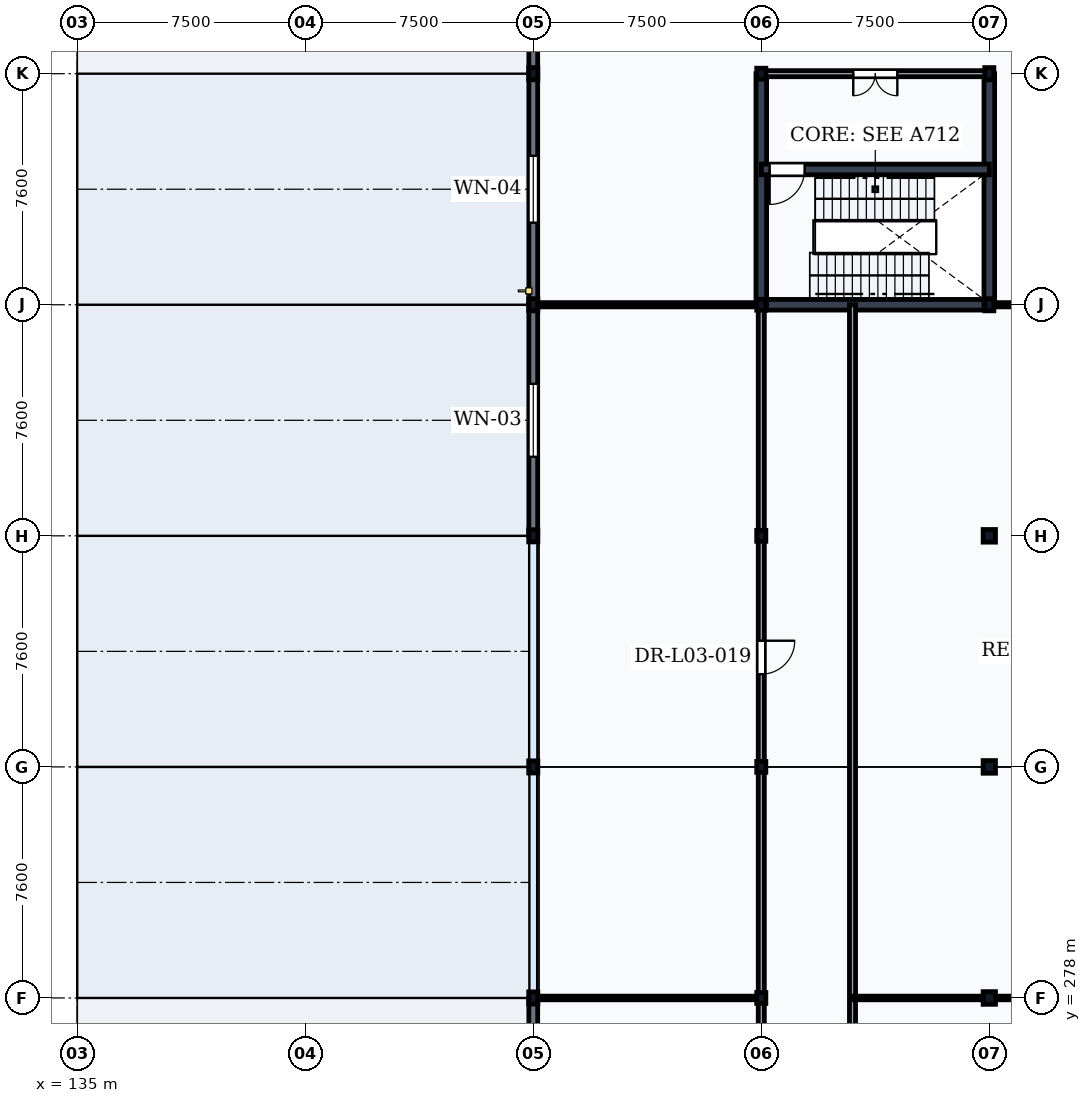
"""IFC4 building model, lengths in metres.
Left out: names, types, materials, properties, quantities, classifications, styles, units other than length and angle.
Written with IfcOpenShell. Run it as: python <this file> out.ifc"""

import sys

from ifc_helpers import new_model, si_unit, direction, frame, frame_2d, origin, origin_2d, place, context, subcontext, project, spatial, rectangle, i_section, extrude, element, fill, save


model = new_model("IFC4")
c1 = context("Model", 3, precision=1e-05, world=origin(), true_north=direction((0.0, 1.0)))
c2 = subcontext(c1, "Body", "Model", "MODEL_VIEW")
j1 = project(units=[si_unit("LENGTHUNIT", "METRE"), si_unit("PLANEANGLEUNIT", "RADIAN")], contexts=[c1])
p1 = place(None, origin())
s1 = spatial("IfcSite", under=j1, at=p1, CompositionType="ELEMENT")
p2 = place(p1, origin())
s2 = spatial("IfcBuilding", under=s1, at=p2, CompositionType="ELEMENT")
p3 = place(p2, frame((0.0, 0.0, 5.4)))
s3 = spatial("IfcBuildingStorey", under=s2, at=p3, CompositionType="ELEMENT", Elevation=5.4)
for number, where, z_axis, x_axis in (
    (1, (135.0, 278.0, 0.0), (0.0, 0.0, 1.0), (1.0, 0.0, 0.0)),
    (2, (135.0, 285.6, 0.0), (0.0, 0.0, 1.0), (1.0, 0.0, 0.0)),
    (3, (135.0, 293.2, 0.0), (0.0, 0.0, 1.0), (1.0, 0.0, 0.0)),
    (4, (135.0, 300.8, 0.0), (0.0, 0.0, 1.0), (1.0, 0.0, 0.0)),
    (5, (135.0, 308.4, 0.0), (0.0, 0.0, 1.0), (1.0, 0.0, 0.0)),
):
    element("IfcColumn", number, at=place(p3, frame(where, z_axis=z_axis, x_axis=x_axis)), inside=s3, PredefinedType="COLUMN", context=c2, shape_type="SweptSolid", body=[
        extrude(i_section(OverallWidth=0.3, OverallDepth=0.45, WebThickness=0.014, FlangeThickness=0.026, FilletRadius=0.027, at=origin_2d()), origin(), (0.0, 0.0, 1.0), 5.1),
    ])
for number, where, z_axis, x_axis in (
    (6, (142.5, 278.0, 0.0), (0.0, 0.0, 1.0), (1.0, 0.0, 0.0)),
    (7, (142.5, 285.6, 0.0), (0.0, 0.0, 1.0), (1.0, 0.0, 0.0)),
    (8, (142.5, 293.2, 0.0), (0.0, 0.0, 1.0), (1.0, 0.0, 0.0)),
    (9, (142.5, 300.8, 0.0), (0.0, 0.0, 1.0), (1.0, 0.0, 0.0)),
    (10, (142.5, 308.4, 0.0), (0.0, 0.0, 1.0), (1.0, 0.0, 0.0)),
):
    element("IfcColumn", number, at=place(p3, frame(where, z_axis=z_axis, x_axis=x_axis)), inside=s3, PredefinedType="COLUMN", context=c2, shape_type="SweptSolid", body=[
        extrude(i_section(OverallWidth=0.3, OverallDepth=0.4, WebThickness=0.013, FlangeThickness=0.024, FilletRadius=0.027, at=origin_2d()), origin(), (0.0, 0.0, 1.0), 5.1),
    ])
for number, where, z_axis, x_axis in (
    (11, (150.0, 278.0, 0.0), (0.0, 0.0, 1.0), (1.0, 0.0, 0.0)),
    (12, (150.0, 285.6, 0.0), (0.0, 0.0, 1.0), (1.0, 0.0, 0.0)),
    (13, (150.0, 293.2, 0.0), (0.0, 0.0, 1.0), (1.0, 0.0, 0.0)),
    (14, (150.0, 300.8, 0.0), (0.0, 0.0, 1.0), (1.0, 0.0, 0.0)),
    (15, (150.0, 308.4, 0.0), (0.0, 0.0, 1.0), (1.0, 0.0, 0.0)),
):
    element("IfcColumn", number, at=place(p3, frame(where, z_axis=z_axis, x_axis=x_axis)), inside=s3, PredefinedType="COLUMN", context=c2, shape_type="SweptSolid", body=[
        extrude(i_section(OverallWidth=0.3, OverallDepth=0.45, WebThickness=0.014, FlangeThickness=0.026, FilletRadius=0.027, at=origin_2d()), origin(), (0.0, 0.0, 1.0), 5.1),
    ])
for number, where, z_axis, x_axis in (
    (16, (157.5, 278.0, 0.0), (0.0, 0.0, 1.0), (1.0, 0.0, 0.0)),
    (17, (157.5, 285.6, 0.0), (0.0, 0.0, 1.0), (1.0, 0.0, 0.0)),
    (18, (157.5, 293.2, 0.0), (0.0, 0.0, 1.0), (1.0, 0.0, 0.0)),
    (19, (157.5, 300.8, 0.0), (0.0, 0.0, 1.0), (1.0, 0.0, 0.0)),
    (20, (157.5, 308.4, 0.0), (0.0, 0.0, 1.0), (1.0, 0.0, 0.0)),
):
    element("IfcColumn", number, at=place(p3, frame(where, z_axis=z_axis, x_axis=x_axis)), inside=s3, PredefinedType="COLUMN", context=c2, shape_type="SweptSolid", body=[
        extrude(i_section(OverallWidth=0.3, OverallDepth=0.4, WebThickness=0.013, FlangeThickness=0.024, FilletRadius=0.027, at=origin_2d()), origin(), (0.0, 0.0, 1.0), 5.1),
    ])
for number, where, z_axis, x_axis in (
    (21, (165.0, 278.0, 0.0), (0.0, 0.0, 1.0), (1.0, 0.0, 0.0)),
    (22, (165.0, 285.6, 0.0), (0.0, 0.0, 1.0), (1.0, 0.0, 0.0)),
    (23, (165.0, 293.2, 0.0), (0.0, 0.0, 1.0), (1.0, 0.0, 0.0)),
):
    element("IfcColumn", number, at=place(p3, frame(where, z_axis=z_axis, x_axis=x_axis)), inside=s3, PredefinedType="COLUMN", context=c2, shape_type="SweptSolid", body=[
        extrude(i_section(OverallWidth=0.418, OverallDepth=0.455, WebThickness=0.042, FlangeThickness=0.068, FilletRadius=0.015, at=origin_2d()), origin(), (0.0, 0.0, 1.0), 5.1),
    ])
for number, where, z_axis, x_axis in (
    (24, (165.0, 300.8, 0.0), (0.0, 0.0, 1.0), (1.0, 0.0, 0.0)),
    (25, (165.0, 308.4, 0.0), (0.0, 0.0, 1.0), (1.0, 0.0, 0.0)),
):
    element("IfcColumn", number, at=place(p3, frame(where, z_axis=z_axis, x_axis=x_axis)), inside=s3, PredefinedType="COLUMN", context=c2, shape_type="SweptSolid", body=[
        extrude(i_section(OverallWidth=0.3, OverallDepth=0.45, WebThickness=0.014, FlangeThickness=0.026, FilletRadius=0.027, at=origin_2d()), origin(), (0.0, 0.0, 1.0), 5.1),
    ])
p4 = place(p3, frame((135.0, 270.406, 0.0), z_axis=(0.0, 0.0, 1.0), x_axis=(0.0, 1.0, 0.0)))
e26 = element("IfcWall", 26, at=p4, inside=s3, PredefinedType="SOLIDWALL", context=c2, shape_type="SweptSolid", body=[
    extrude(rectangle(XDim=7.588, YDim=0.29, at=frame_2d((3.794, 0.0))), origin(), (0.0, 0.0, 1.0), 4.578),
])
p5 = place(p4, frame((2.994, 0.0, 0.95)))
e27 = element("IfcOpeningElement", 27, at=p5, cuts=e26, PredefinedType="OPENING", context=c2, shape_type="SweptSolid", body=[
    extrude(rectangle(XDim=1.6, YDim=2.4, at=frame_2d((0.8, 1.2))), frame((0.0, 0.16, 0.0), z_axis=(0.0, -1.0, 0.0), x_axis=(1.0, 0.0, 0.0)), (0.0, 0.0, 1.0), 0.32),
])
p6 = place(p3, frame((135.0, 293.206, 0.0), z_axis=(0.0, 0.0, 1.0), x_axis=(0.0, 1.0, 0.0)))
e28 = element("IfcWall", 28, at=p6, inside=s3, PredefinedType="SOLIDWALL", context=c2, shape_type="SweptSolid", body=[
    extrude(rectangle(XDim=7.588, YDim=0.29, at=frame_2d((3.794, 0.0))), origin(), (0.0, 0.0, 1.0), 4.578),
])
p7 = place(p6, frame((2.494, 0.0, 0.95)))
e29 = element("IfcOpeningElement", 29, at=p7, cuts=e28, PredefinedType="OPENING", context=c2, shape_type="SweptSolid", body=[
    extrude(rectangle(XDim=2.6, YDim=3.0, at=frame_2d((1.3, 1.5))), frame((0.0, 0.16, 0.0), z_axis=(0.0, -1.0, 0.0), x_axis=(1.0, 0.0, 0.0)), (0.0, 0.0, 1.0), 0.32),
])
p8 = place(p3, frame((135.0, 300.806, 0.0), z_axis=(0.0, 0.0, 1.0), x_axis=(0.0, 1.0, 0.0)))
e30 = element("IfcWall", 30, at=p8, inside=s3, PredefinedType="SOLIDWALL", context=c2, shape_type="SweptSolid", body=[
    extrude(rectangle(XDim=7.588, YDim=0.29, at=frame_2d((3.794, 0.0))), origin(), (0.0, 0.0, 1.0), 4.578),
])
p9 = place(p8, frame((2.594, 0.0, 0.95)))
e31 = element("IfcOpeningElement", 31, at=p9, cuts=e30, PredefinedType="OPENING", context=c2, shape_type="SweptSolid", body=[
    extrude(rectangle(XDim=2.4, YDim=2.8, at=frame_2d((1.2, 1.4))), frame((0.0, 0.16, 0.0), z_axis=(0.0, -1.0, 0.0), x_axis=(1.0, 0.0, 0.0)), (0.0, 0.0, 1.0), 0.32),
])
p10 = place(p3, frame((135.0, 308.406, 0.0), z_axis=(0.0, 0.0, 1.0), x_axis=(0.0, 1.0, 0.0)))
e32 = element("IfcWall", 32, at=p10, inside=s3, PredefinedType="SOLIDWALL", context=c2, shape_type="SweptSolid", body=[
    extrude(rectangle(XDim=7.588, YDim=0.29, at=frame_2d((3.794, 0.0))), origin(), (0.0, 0.0, 1.0), 4.578),
])
p11 = place(p10, frame((2.694, 0.0, 0.95)))
e33 = element("IfcOpeningElement", 33, at=p11, cuts=e32, PredefinedType="OPENING", context=c2, shape_type="SweptSolid", body=[
    extrude(rectangle(XDim=2.2, YDim=2.8, at=frame_2d((1.1, 1.4))), frame((0.0, 0.16, 0.0), z_axis=(0.0, -1.0, 0.0), x_axis=(1.0, 0.0, 0.0)), (0.0, 0.0, 1.0), 0.32),
])
p12 = place(p3, frame((135.1, 248.6, 5.1), z_axis=(0.0, 0.0, 1.0), x_axis=(0.0, 1.0, 0.0)))
e34 = element("IfcWall", 34, at=p12, inside=s3, PredefinedType="PARAPET", context=c2, shape_type="SweptSolid", body=[
    extrude(rectangle(XDim=89.2, YDim=0.18, at=frame_2d((44.6, 0.0))), origin(), (0.0, 0.0, 1.0), 1.2),
])
p13 = place(p3, frame((157.5, 300.8, 0.0), z_axis=(0.0, 0.0, 1.0), x_axis=(1.0, 0.0, 0.0)))
e35 = element("IfcWall", 35, at=p13, inside=s3, PredefinedType="SHEAR", context=c2, shape_type="SweptSolid", body=[
    extrude(rectangle(XDim=7.5, YDim=0.35, at=frame_2d((3.75, 0.0))), origin(), (0.0, 0.0, 1.0), 4.86),
])
for number, where, z_axis, x_axis in (
    (36, (157.5, 300.8, 0.0), (0.0, 0.0, 1.0), (0.0, 1.0, 0.0)),
    (37, (165.0, 300.8, 0.0), (0.0, 0.0, 1.0), (0.0, 1.0, 0.0)),
):
    element("IfcWall", number, at=place(p3, frame(where, z_axis=z_axis, x_axis=x_axis)), inside=s3, PredefinedType="SHEAR", context=c2, shape_type="SweptSolid", body=[
        extrude(rectangle(XDim=7.6, YDim=0.35, at=frame_2d((3.8, 0.0))), origin(), (0.0, 0.0, 1.0), 4.86),
    ])
p14 = place(p3, frame((157.5, 305.25, 0.0), z_axis=(0.0, 0.0, 1.0), x_axis=(1.0, 0.0, 0.0)))
e38 = element("IfcWall", 38, at=p14, inside=s3, PredefinedType="SHEAR", context=c2, shape_type="SweptSolid", body=[
    extrude(rectangle(XDim=7.5, YDim=0.35, at=frame_2d((3.75, 0.0))), origin(), (0.0, 0.0, 1.0), 4.86),
])
p15 = place(p14, frame((0.275, 0.0, 0.0)))
e39 = element("IfcOpeningElement", 39, at=p15, cuts=e38, PredefinedType="OPENING", context=c2, shape_type="SweptSolid", body=[
    extrude(rectangle(XDim=1.15, YDim=2.15, at=frame_2d((0.575, 1.075))), frame((0.0, 0.19, 0.0), z_axis=(0.0, -1.0, 0.0), x_axis=(1.0, 0.0, 0.0)), (0.0, 0.0, 1.0), 0.38),
])
p16 = place(p3, frame((157.5, 308.4, 0.0), z_axis=(0.0, 0.0, 1.0), x_axis=(1.0, 0.0, 0.0)))
e40 = element("IfcWall", 40, at=p16, inside=s3, PredefinedType="PARTITIONING", context=c2, shape_type="SweptSolid", body=[
    extrude(rectangle(XDim=7.5, YDim=0.2, at=frame_2d((3.75, 0.0))), origin(), (0.0, 0.0, 1.0), 4.498),
])
p17 = place(p16, frame((3.025, 0.0, 0.0)))
e41 = element("IfcOpeningElement", 41, at=p17, cuts=e40, PredefinedType="OPENING", context=c2, shape_type="SweptSolid", body=[
    extrude(rectangle(XDim=1.45, YDim=2.2, at=frame_2d((0.725, 1.1))), frame((0.0, 0.115, 0.0), z_axis=(0.0, -1.0, 0.0), x_axis=(1.0, 0.0, 0.0)), (0.0, 0.0, 1.0), 0.23),
])
p18 = place(p3, frame((157.5, 258.2, 0.0), z_axis=(0.0, 0.0, 1.0), x_axis=(0.0, 1.0, 0.0)))
e42 = element("IfcWall", 42, at=p18, inside=s3, PredefinedType="PARTITIONING", context=c2, shape_type="SweptSolid", body=[
    extrude(rectangle(XDim=42.6, YDim=0.2, at=frame_2d((21.3, 0.0))), origin(), (0.0, 0.0, 1.0), 4.498),
])
p19 = place(p18, frame((9.45, 0.0, 0.0)))
e43 = element("IfcOpeningElement", 43, at=p19, cuts=e42, PredefinedType="OPENING", context=c2, shape_type="SweptSolid", body=[
    extrude(rectangle(XDim=1.1, YDim=2.1, at=frame_2d((0.55, 1.05))), frame((0.0, 0.115, 0.0), z_axis=(0.0, -1.0, 0.0), x_axis=(1.0, 0.0, 0.0)), (0.0, 0.0, 1.0), 0.23),
])
p20 = place(p18, frame((30.45, 0.0, 0.0)))
e44 = element("IfcOpeningElement", 44, at=p20, cuts=e42, PredefinedType="OPENING", context=c2, shape_type="SweptSolid", body=[
    extrude(rectangle(XDim=1.1, YDim=2.1, at=frame_2d((0.55, 1.05))), frame((0.0, 0.115, 0.0), z_axis=(0.0, -1.0, 0.0), x_axis=(1.0, 0.0, 0.0)), (0.0, 0.0, 1.0), 0.23),
])
p21 = place(p3, frame((157.5, 308.4, 0.0), z_axis=(0.0, 0.0, 1.0), x_axis=(0.0, 1.0, 0.0)))
e45 = element("IfcWall", 45, at=p21, inside=s3, PredefinedType="PARTITIONING", context=c2, shape_type="SweptSolid", body=[
    extrude(rectangle(XDim=29.6, YDim=0.2, at=frame_2d((14.8, 0.0))), origin(), (0.0, 0.0, 1.0), 4.498),
])
p22 = place(p21, frame((3.45, 0.0, 0.0)))
e46 = element("IfcOpeningElement", 46, at=p22, cuts=e45, PredefinedType="OPENING", context=c2, shape_type="SweptSolid", body=[
    extrude(rectangle(XDim=1.1, YDim=2.1, at=frame_2d((0.55, 1.05))), frame((0.0, 0.115, 0.0), z_axis=(0.0, -1.0, 0.0), x_axis=(1.0, 0.0, 0.0)), (0.0, 0.0, 1.0), 0.23),
])
p23 = place(p21, frame((17.25, 0.0, 0.0)))
e47 = element("IfcOpeningElement", 47, at=p23, cuts=e45, PredefinedType="OPENING", context=c2, shape_type="SweptSolid", body=[
    extrude(rectangle(XDim=1.5, YDim=2.25, at=frame_2d((0.75, 1.125))), frame((0.0, 0.115, 0.0), z_axis=(0.0, -1.0, 0.0), x_axis=(1.0, 0.0, 0.0)), (0.0, 0.0, 1.0), 0.23),
])
p24 = place(p3, frame((160.5, 258.2, 0.0), z_axis=(0.0, 0.0, 1.0), x_axis=(0.0, 1.0, 0.0)))
e48 = element("IfcWall", 48, at=p24, inside=s3, PredefinedType="PARTITIONING", context=c2, shape_type="SweptSolid", body=[
    extrude(rectangle(XDim=42.6, YDim=0.2, at=frame_2d((21.3, 0.0))), origin(), (0.0, 0.0, 1.0), 4.86),
])
p25 = place(p24, frame((20.34, 0.0, 0.0)))
e49 = element("IfcOpeningElement", 49, at=p25, cuts=e48, PredefinedType="OPENING", context=c2, shape_type="SweptSolid", body=[
    extrude(rectangle(XDim=1.8, YDim=2.4, at=frame_2d((0.9, 1.2))), frame((0.0, 0.115, 0.0), z_axis=(0.0, -1.0, 0.0), x_axis=(1.0, 0.0, 0.0)), (0.0, 0.0, 1.0), 0.23),
])
p26 = place(p3, frame((135.0, 278.0, 0.0), z_axis=(0.0, 0.0, 1.0), x_axis=(1.0, 0.0, 0.0)))
e50 = element("IfcWall", 50, at=p26, inside=s3, PredefinedType="PARTITIONING", context=c2, shape_type="SweptSolid", body=[
    extrude(rectangle(XDim=22.5, YDim=0.12, at=frame_2d((11.25, 0.0))), origin(), (0.0, 0.0, 1.0), 4.488),
])
p27 = place(p26, frame((8.3, 0.0, 0.0)))
e51 = element("IfcOpeningElement", 51, at=p27, cuts=e50, PredefinedType="OPENING", context=c2, shape_type="SweptSolid", body=[
    extrude(rectangle(XDim=1.0, YDim=2.1, at=frame_2d((0.5, 1.05))), frame((0.0, 0.075, 0.0), z_axis=(0.0, -1.0, 0.0), x_axis=(1.0, 0.0, 0.0)), (0.0, 0.0, 1.0), 0.15),
])
p28 = place(p3, frame((135.0, 300.8, 0.0), z_axis=(0.0, 0.0, 1.0), x_axis=(1.0, 0.0, 0.0)))
e52 = element("IfcWall", 52, at=p28, inside=s3, PredefinedType="PARTITIONING", context=c2, shape_type="SweptSolid", body=[
    extrude(rectangle(XDim=22.5, YDim=0.12, at=frame_2d((11.25, 0.0))), origin(), (0.0, 0.0, 1.0), 4.488),
])
p29 = place(p28, frame((8.3, 0.0, 0.0)))
e53 = element("IfcOpeningElement", 53, at=p29, cuts=e52, PredefinedType="OPENING", context=c2, shape_type="SweptSolid", body=[
    extrude(rectangle(XDim=1.0, YDim=2.1, at=frame_2d((0.5, 1.05))), frame((0.0, 0.075, 0.0), z_axis=(0.0, -1.0, 0.0), x_axis=(1.0, 0.0, 0.0)), (0.0, 0.0, 1.0), 0.15),
])
p30 = place(p3, frame((165.0, 308.4, 0.0), z_axis=(0.0, 0.0, 1.0), x_axis=(1.0, 0.0, 0.0)))
e54 = element("IfcWall", 54, at=p30, inside=s3, PredefinedType="PARTITIONING", context=c2, shape_type="SweptSolid", body=[
    extrude(rectangle(XDim=32.0, YDim=0.14, at=frame_2d((16.0, 0.0))), origin(), (0.0, 0.0, 1.0), 4.408),
])
p31 = place(p30, frame((16.6, 0.0, 0.0)))
e55 = element("IfcOpeningElement", 55, at=p31, cuts=e54, PredefinedType="OPENING", context=c2, shape_type="SweptSolid", body=[
    extrude(rectangle(XDim=1.8, YDim=2.4, at=frame_2d((0.9, 1.2))), frame((0.0, 0.085, 0.0), z_axis=(0.0, -1.0, 0.0), x_axis=(1.0, 0.0, 0.0)), (0.0, 0.0, 1.0), 0.17),
])
p32 = place(p7, origin())
e56 = element("IfcWindow", 56, at=p32, inside=s3, PartitioningType="DOUBLE_PANEL_VERTICAL", PredefinedType="WINDOW", context=c2, shape_type="SweptSolid", body=[
    extrude(rectangle(XDim=2.6, YDim=3.0, at=frame_2d((1.3, 1.5))), frame((0.0, 0.03, 0.0), z_axis=(0.0, -1.0, 0.0), x_axis=(1.0, 0.0, 0.0)), (0.0, 0.0, 1.0), 0.06),
])
fill(e29, e56)
p33 = place(p9, origin())
e57 = element("IfcWindow", 57, at=p33, inside=s3, PartitioningType="DOUBLE_PANEL_VERTICAL", PredefinedType="WINDOW", context=c2, shape_type="SweptSolid", body=[
    extrude(rectangle(XDim=2.4, YDim=2.8, at=frame_2d((1.2, 1.4))), frame((0.0, 0.03, 0.0), z_axis=(0.0, -1.0, 0.0), x_axis=(1.0, 0.0, 0.0)), (0.0, 0.0, 1.0), 0.06),
])
fill(e31, e57)
p34 = place(p15, frame((1.15, 0.0, 0.0), z_axis=(0.0, 0.0, 1.0), x_axis=(-1.0, 0.0, 0.0)))
e58 = element("IfcDoor", 58, at=p34, inside=s3, OperationType="SINGLE_SWING_RIGHT", PredefinedType="DOOR", context=c2, shape_type="SweptSolid", body=[
    extrude(rectangle(XDim=1.15, YDim=2.15, at=frame_2d((0.575, 1.075))), frame((0.0, 0.025, 0.0), z_axis=(0.0, -1.0, 0.0), x_axis=(1.0, 0.0, 0.0)), (0.0, 0.0, 1.0), 0.05),
])
fill(e39, e58)
p35 = place(p17, frame((1.45, 0.0, 0.0), z_axis=(0.0, 0.0, 1.0), x_axis=(-1.0, 0.0, 0.0)))
e59 = element("IfcDoor", 59, at=p35, inside=s3, OperationType="DOUBLE_DOOR_SINGLE_SWING", PredefinedType="DOOR", context=c2, shape_type="SweptSolid", body=[
    extrude(rectangle(XDim=1.45, YDim=2.2, at=frame_2d((0.725, 1.1))), frame((0.0, 0.025, 0.0), z_axis=(0.0, -1.0, 0.0), x_axis=(1.0, 0.0, 0.0)), (0.0, 0.0, 1.0), 0.05),
])
fill(e41, e59)
p36 = place(p20, origin())
e60 = element("IfcDoor", 60, at=p36, inside=s3, OperationType="SINGLE_SWING_RIGHT", PredefinedType="DOOR", context=c2, shape_type="SweptSolid", body=[
    extrude(rectangle(XDim=1.1, YDim=2.1, at=frame_2d((0.55, 1.05))), frame((0.0, 0.025, 0.0), z_axis=(0.0, -1.0, 0.0), x_axis=(1.0, 0.0, 0.0)), (0.0, 0.0, 1.0), 0.05),
])
fill(e44, e60)
p37 = place(p25, frame((1.8, 0.0, 0.0), z_axis=(0.0, 0.0, 1.0), x_axis=(-1.0, 0.0, 0.0)))
e61 = element("IfcDoor", 61, at=p37, inside=s3, OperationType="DOUBLE_DOOR_SINGLE_SWING", PredefinedType="DOOR", context=c2, shape_type="SweptSolid", body=[
    extrude(rectangle(XDim=1.8, YDim=2.4, at=frame_2d((0.9, 1.2))), frame((0.0, 0.025, 0.0), z_axis=(0.0, -1.0, 0.0), x_axis=(1.0, 0.0, 0.0)), (0.0, 0.0, 1.0), 0.05),
])
fill(e49, e61)
p38 = place(p27, origin())
e62 = element("IfcDoor", 62, at=p38, inside=s3, OperationType="SINGLE_SWING_LEFT", PredefinedType="DOOR", context=c2, shape_type="SweptSolid", body=[
    extrude(rectangle(XDim=1.0, YDim=2.1, at=frame_2d((0.5, 1.05))), frame((0.0, 0.025, 0.0), z_axis=(0.0, -1.0, 0.0), x_axis=(1.0, 0.0, 0.0)), (0.0, 0.0, 1.0), 0.05),
])
fill(e51, e62)
p39 = place(p29, frame((1.0, 0.0, 0.0), z_axis=(0.0, 0.0, 1.0), x_axis=(-1.0, 0.0, 0.0)))
e63 = element("IfcDoor", 63, at=p39, inside=s3, OperationType="SINGLE_SWING_RIGHT", PredefinedType="DOOR", context=c2, shape_type="SweptSolid", body=[
    extrude(rectangle(XDim=1.0, YDim=2.1, at=frame_2d((0.5, 1.05))), frame((0.0, 0.025, 0.0), z_axis=(0.0, -1.0, 0.0), x_axis=(1.0, 0.0, 0.0)), (0.0, 0.0, 1.0), 0.05),
])
fill(e53, e63)
save(model, sys.argv[1])
